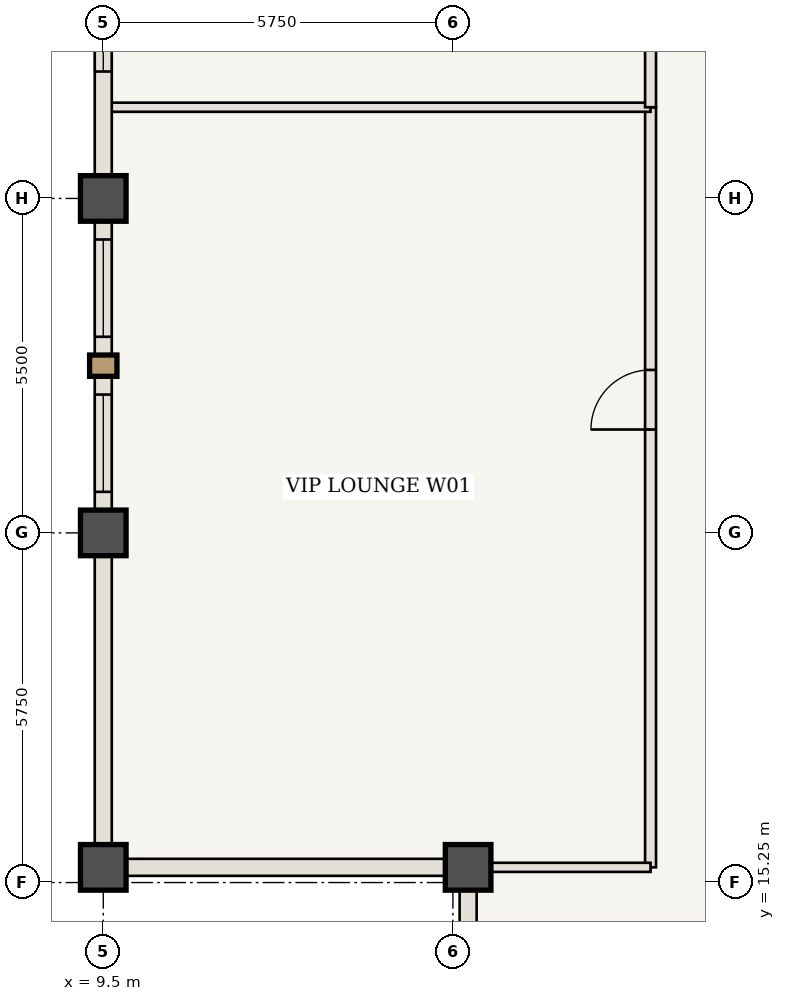
"""IFC4 building model, lengths in metres.
Left out: names, types, materials, properties, quantities, classifications, styles, units other than length and angle.
Written with IfcOpenShell. Run it as: python <this file> out.ifc"""

import sys

from ifc_helpers import new_model, si_unit, direction, frame, frame_2d, origin, origin_2d, place, context, subcontext, project, spatial, rectangle, extrude, element, fill, save


model = new_model("IFC4")
c1 = context("Model", 3, precision=1e-05, world=origin(), true_north=direction((0.0, 1.0)))
c2 = subcontext(c1, "Body", "Model", "MODEL_VIEW")
j1 = project(units=[si_unit("LENGTHUNIT", "METRE"), si_unit("PLANEANGLEUNIT", "RADIAN")], contexts=[c1])
p1 = place(None, origin())
s1 = spatial("IfcSite", under=j1, at=p1, CompositionType="ELEMENT")
p2 = place(p1, origin())
s2 = spatial("IfcBuilding", under=s1, at=p2, CompositionType="ELEMENT")
p3 = place(p2, frame((0.0, 0.0, 273.7)))
s3 = spatial("IfcBuildingStorey", under=s2, at=p3, CompositionType="ELEMENT", Elevation=273.7)
for number, where, z_axis, x_axis in (
    (1, (15.5, 15.5, 0.0), (0.0, 0.0, 1.0), (1.0, 0.0, 0.0)),
    (2, (9.5, 15.5, 0.0), (0.0, 0.0, 1.0), (1.0, 0.0, 0.0)),
    (3, (9.5, 21.0, 0.0), (0.0, 0.0, 1.0), (1.0, 0.0, 0.0)),
    (4, (9.5, 26.5, 0.0), (0.0, 0.0, 1.0), (1.0, 0.0, 0.0)),
):
    element("IfcColumn", number, at=place(p3, frame(where, z_axis=z_axis, x_axis=x_axis)), inside=s3, PredefinedType="COLUMN", context=c2, shape_type="SweptSolid", body=[
        extrude(rectangle(XDim=0.75, YDim=0.75, at=origin_2d()), origin(), (0.0, 0.0, 1.0), 3.85),
    ])
p4 = place(p3, frame((18.5, 15.5, 0.0), z_axis=(0.0, 0.0, 1.0), x_axis=(0.0, 1.0, 0.0)))
e5 = element("IfcWall", 5, at=p4, inside=s3, PredefinedType="STANDARD", context=c2, shape_type="SweptSolid", body=[
    extrude(rectangle(XDim=12.5, YDim=0.18, at=frame_2d((6.25, 0.0))), origin(), (0.0, 0.0, 1.0), 3.685),
])
p5 = place(p4, frame((7.2, 0.0, 0.0)))
e6 = element("IfcOpeningElement", 6, at=p5, cuts=e5, PredefinedType="OPENING", context=c2, shape_type="SweptSolid", body=[
    extrude(rectangle(XDim=0.98, YDim=2.2, at=frame_2d((0.49, 1.1))), frame((0.0, 0.1, 0.0), z_axis=(0.0, -1.0, 0.0), x_axis=(1.0, 0.0, 0.0)), (0.0, 0.0, 1.0), 0.2),
])
p6 = place(p3, frame((9.56, 28.0, 0.0), z_axis=(0.0, 0.0, 1.0), x_axis=(1.0, 0.0, 0.0)))
e7 = element("IfcWall", 7, at=p6, inside=s3, PredefinedType="STANDARD", context=c2, shape_type="SweptSolid", body=[
    extrude(rectangle(XDim=8.94, YDim=0.15, at=frame_2d((4.47, 0.0))), origin(), (0.0, 0.0, 1.0), 3.685),
])
p7 = place(p3, frame((18.5, 28.0, 0.0), z_axis=(0.0, 0.0, 1.0), x_axis=(0.0, 1.0, 0.0)))
e8 = element("IfcWall", 8, at=p7, inside=s3, PredefinedType="STANDARD", context=c2, shape_type="SweptSolid", body=[
    extrude(rectangle(XDim=11.5, YDim=0.18, at=frame_2d((5.75, 0.0))), origin(), (0.0, 0.0, 1.0), 3.685),
])
p8 = place(p7, frame((5.25, 0.0, 0.0)))
e9 = element("IfcOpeningElement", 9, at=p8, cuts=e8, PredefinedType="OPENING", context=c2, shape_type="SweptSolid", body=[
    extrude(rectangle(XDim=0.98, YDim=2.2, at=frame_2d((0.49, 1.1))), frame((0.0, 0.1, 0.0), z_axis=(0.0, -1.0, 0.0), x_axis=(1.0, 0.0, 0.0)), (0.0, 0.0, 1.0), 0.2),
])
p9 = place(p3, frame((15.5, 15.5, 0.0), z_axis=(0.0, 0.0, 1.0), x_axis=(1.0, 0.0, 0.0)))
e10 = element("IfcWall", 10, at=p9, inside=s3, PredefinedType="STANDARD", context=c2, shape_type="SweptSolid", body=[
    extrude(rectangle(XDim=3.0, YDim=0.15, at=frame_2d((1.5, 0.0))), origin(), (0.0, 0.0, 1.0), 3.685),
])
p10 = place(p3, frame((9.5, 15.5, 0.0), z_axis=(0.0, 0.0, 1.0), x_axis=(0.0, 1.0, 0.0)))
e11 = element("IfcWall", 11, at=p10, inside=s3, PredefinedType="USERDEFINED", context=c2, shape_type="SweptSolid", body=[
    extrude(rectangle(XDim=5.5, YDim=0.28, at=frame_2d((2.75, 0.0))), origin(), (0.0, 0.0, 1.0), 2.985),
])
p11 = place(p3, frame((9.5, 21.0, 0.0), z_axis=(0.0, 0.0, 1.0), x_axis=(0.0, 1.0, 0.0)))
e12 = element("IfcWall", 12, at=p11, inside=s3, PredefinedType="USERDEFINED", context=c2, shape_type="SweptSolid", body=[
    extrude(rectangle(XDim=5.5, YDim=0.28, at=frame_2d((2.75, 0.0))), origin(), (0.0, 0.0, 1.0), 2.985),
])
p12 = place(p11, frame((0.675, 0.0, 0.85)))
e13 = element("IfcOpeningElement", 13, at=p12, cuts=e12, PredefinedType="OPENING", context=c2, shape_type="SweptSolid", body=[
    extrude(rectangle(XDim=1.6, YDim=1.935, at=frame_2d((0.8, 0.968))), frame((0.0, 0.15, 0.0), z_axis=(0.0, -1.0, 0.0), x_axis=(1.0, 0.0, 0.0)), (0.0, 0.0, 1.0), 0.3),
])
p13 = place(p11, frame((3.225, 0.0, 0.85)))
e14 = element("IfcOpeningElement", 14, at=p13, cuts=e12, PredefinedType="OPENING", context=c2, shape_type="SweptSolid", body=[
    extrude(rectangle(XDim=1.6, YDim=1.935, at=frame_2d((0.8, 0.968))), frame((0.0, 0.15, 0.0), z_axis=(0.0, -1.0, 0.0), x_axis=(1.0, 0.0, 0.0)), (0.0, 0.0, 1.0), 0.3),
])
p14 = place(p3, frame((9.5, 26.5, 0.0), z_axis=(0.0, 0.0, 1.0), x_axis=(0.0, 1.0, 0.0)))
e15 = element("IfcWall", 15, at=p14, inside=s3, PredefinedType="USERDEFINED", context=c2, shape_type="SweptSolid", body=[
    extrude(rectangle(XDim=5.5, YDim=0.28, at=frame_2d((2.75, 0.0))), origin(), (0.0, 0.0, 1.0), 2.985),
])
p15 = place(p14, frame((2.087, 0.0, 0.85)))
e16 = element("IfcOpeningElement", 16, at=p15, cuts=e15, PredefinedType="OPENING", context=c2, shape_type="SweptSolid", body=[
    extrude(rectangle(XDim=2.5, YDim=1.935, at=frame_2d((1.25, 0.968))), frame((0.0, 0.15, 0.0), z_axis=(0.0, -1.0, 0.0), x_axis=(1.0, 0.0, 0.0)), (0.0, 0.0, 1.0), 0.3),
])
for number, where, z_axis, x_axis in (
    (17, (15.5, 9.5, 0.0), (0.0, 0.0, 1.0), (0.0, 1.0, 0.0)),
    (18, (15.5, 15.5, 0.0), (0.0, 0.0, 1.0), (-1.0, 0.0, 0.0)),
):
    element("IfcWall", number, at=place(p3, frame(where, z_axis=z_axis, x_axis=x_axis)), inside=s3, PredefinedType="USERDEFINED", context=c2, shape_type="SweptSolid", body=[
        extrude(rectangle(XDim=6.0, YDim=0.28, at=frame_2d((3.0, 0.0))), origin(), (0.0, 0.0, 1.0), 2.985),
    ])
p16 = place(p5, origin())
e19 = element("IfcDoor", 19, at=p16, inside=s3, OperationType="SINGLE_SWING_LEFT", PredefinedType="DOOR", context=c2, shape_type="SweptSolid", body=[
    extrude(rectangle(XDim=0.98, YDim=2.2, at=frame_2d((0.49, 1.1))), frame((0.0, 0.025, 0.0), z_axis=(0.0, -1.0, 0.0), x_axis=(1.0, 0.0, 0.0)), (0.0, 0.0, 1.0), 0.05),
])
fill(e6, e19)
p17 = place(p12, origin())
e20 = element("IfcWindow", 20, at=p17, inside=s3, PartitioningType="SINGLE_PANEL", PredefinedType="WINDOW", context=c2, shape_type="SweptSolid", body=[
    extrude(rectangle(XDim=1.6, YDim=1.935, at=frame_2d((0.8, 0.968))), frame((0.0, 0.03, 0.0), z_axis=(0.0, -1.0, 0.0), x_axis=(1.0, 0.0, 0.0)), (0.0, 0.0, 1.0), 0.06),
])
fill(e13, e20)
p18 = place(p13, origin())
e21 = element("IfcWindow", 21, at=p18, inside=s3, PartitioningType="SINGLE_PANEL", PredefinedType="WINDOW", context=c2, shape_type="SweptSolid", body=[
    extrude(rectangle(XDim=1.6, YDim=1.935, at=frame_2d((0.8, 0.968))), frame((0.0, 0.03, 0.0), z_axis=(0.0, -1.0, 0.0), x_axis=(1.0, 0.0, 0.0)), (0.0, 0.0, 1.0), 0.06),
])
fill(e14, e21)
p19 = place(p15, origin())
e22 = element("IfcWindow", 22, at=p19, inside=s3, PartitioningType="SINGLE_PANEL", PredefinedType="WINDOW", context=c2, shape_type="SweptSolid", body=[
    extrude(rectangle(XDim=2.5, YDim=1.935, at=frame_2d((1.25, 0.968))), frame((0.0, 0.03, 0.0), z_axis=(0.0, -1.0, 0.0), x_axis=(1.0, 0.0, 0.0)), (0.0, 0.0, 1.0), 0.06),
])
fill(e16, e22)
save(model, sys.argv[1])
